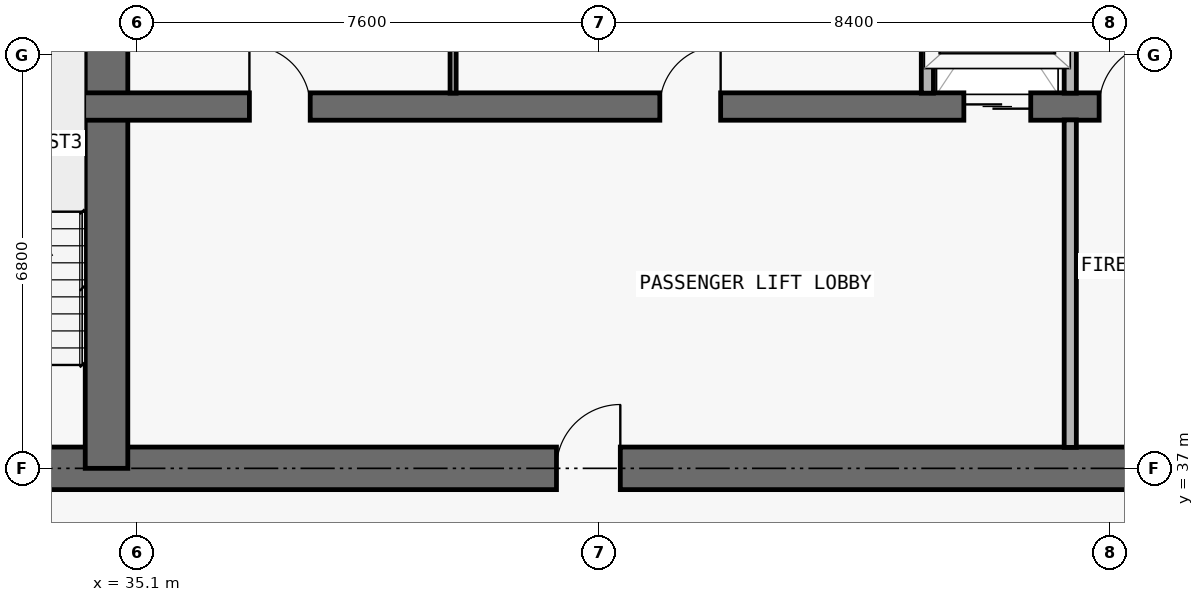
"""IFC4 building model, lengths in metres.
Left out: names, types, materials, properties, quantities, classifications, styles, units other than length and angle.
Written with IfcOpenShell. Run it as: python <this file> out.ifc"""

import sys

from ifc_helpers import new_model, si_unit, direction, frame, frame_2d, origin, place, context, subcontext, project, spatial, rectangle, extrude, element, fill, save


model = new_model("IFC4")
c1 = context("Model", 3, precision=1e-05, world=origin(), true_north=direction((0.0, 1.0)))
c2 = subcontext(c1, "Body", "Model", "MODEL_VIEW")
j1 = project(units=[si_unit("LENGTHUNIT", "METRE"), si_unit("PLANEANGLEUNIT", "RADIAN")], contexts=[c1])
p1 = place(None, origin())
s1 = spatial("IfcSite", under=j1, at=p1, CompositionType="ELEMENT")
p2 = place(p1, origin())
s2 = spatial("IfcBuilding", under=s1, at=p2, CompositionType="ELEMENT")
p3 = place(p2, frame((0.0, 0.0, 246.3)))
s3 = spatial("IfcBuildingStorey", under=s2, at=p3, CompositionType="ELEMENT", Elevation=246.3)
p4 = place(p3, frame((17.95, 37.0, 0.0), z_axis=(0.0, 0.0, 1.0), x_axis=(1.0, 0.0, 0.0)))
e1 = element("IfcWall", 1, at=p4, inside=s3, PredefinedType="SHEAR", context=c2, shape_type="SweptSolid", body=[
    extrude(rectangle(XDim=41.9, YDim=0.7, at=frame_2d((20.95, 0.0))), origin(), (0.0, 0.0, 1.0), 3.05),
])
p5 = place(p4, frame((14.35, 0.0, 0.0)))
e2 = element("IfcOpeningElement", 2, at=p5, cuts=e1, PredefinedType="OPENING", context=c2, shape_type="SweptSolid", body=[
    extrude(rectangle(XDim=1.1, YDim=2.15, at=frame_2d((0.55, 1.075))), frame((0.0, 0.36, 0.0), z_axis=(0.0, -1.0, 0.0), x_axis=(1.0, 0.0, 0.0)), (0.0, 0.0, 1.0), 0.72),
])
p6 = place(p4, frame((6.2, 0.0, 0.0)))
e3 = element("IfcOpeningElement", 3, at=p6, cuts=e1, PredefinedType="OPENING", context=c2, shape_type="SweptSolid", body=[
    extrude(rectangle(XDim=1.05, YDim=2.15, at=frame_2d((0.525, 1.075))), frame((0.0, 0.36, 0.0), z_axis=(0.0, -1.0, 0.0), x_axis=(1.0, 0.0, 0.0)), (0.0, 0.0, 1.0), 0.72),
])
p7 = place(p4, frame((34.7, 0.0, 0.0)))
e4 = element("IfcOpeningElement", 4, at=p7, cuts=e1, PredefinedType="OPENING", context=c2, shape_type="SweptSolid", body=[
    extrude(rectangle(XDim=1.05, YDim=2.15, at=frame_2d((0.525, 1.075))), frame((0.0, 0.36, 0.0), z_axis=(0.0, -1.0, 0.0), x_axis=(1.0, 0.0, 0.0)), (0.0, 0.0, 1.0), 0.72),
])
p8 = place(p4, frame((10.812, 0.0, 0.0)))
e5 = element("IfcOpeningElement", 5, at=p8, cuts=e1, PredefinedType="OPENING", context=c2, shape_type="SweptSolid", body=[
    extrude(rectangle(XDim=1.05, YDim=2.15, at=frame_2d((0.525, 1.075))), frame((0.0, 0.36, 0.0), z_axis=(0.0, -1.0, 0.0), x_axis=(1.0, 0.0, 0.0)), (0.0, 0.0, 1.0), 0.72),
])
p9 = place(p4, frame((24.05, 0.0, 0.0)))
e6 = element("IfcOpeningElement", 6, at=p9, cuts=e1, PredefinedType="OPENING", context=c2, shape_type="SweptSolid", body=[
    extrude(rectangle(XDim=1.05, YDim=2.15, at=frame_2d((0.525, 1.075))), frame((0.0, 0.36, 0.0), z_axis=(0.0, -1.0, 0.0), x_axis=(1.0, 0.0, 0.0)), (0.0, 0.0, 1.0), 0.72),
])
p10 = place(p3, frame((34.6, 37.0, 0.0), z_axis=(0.0, 0.0, 1.0), x_axis=(0.0, 1.0, 0.0)))
e7 = element("IfcWall", 7, at=p10, inside=s3, PredefinedType="SHEAR", context=c2, shape_type="SweptSolid", body=[
    extrude(rectangle(XDim=9.575, YDim=0.7, at=frame_2d((4.788, 0.0))), origin(), (0.0, 0.0, 1.0), 3.05),
])
p11 = place(p3, frame((22.25, 42.95, 0.0), z_axis=(0.0, 0.0, 1.0), x_axis=(1.0, 0.0, 0.0)))
e8 = element("IfcWall", 8, at=p11, inside=s3, PredefinedType="SHEAR", context=c2, shape_type="SweptSolid", body=[
    extrude(rectangle(XDim=33.3, YDim=0.45, at=frame_2d((16.65, 0.0))), origin(), (0.0, 0.0, 1.0), 3.05),
])
p12 = place(p11, frame((1.05, 0.0, 0.0)))
e9 = element("IfcOpeningElement", 9, at=p12, cuts=e8, PredefinedType="OPENING", context=c2, shape_type="SweptSolid", body=[
    extrude(rectangle(XDim=1.2, YDim=2.2, at=frame_2d((0.6, 1.1))), frame((0.0, 0.235, 0.0), z_axis=(0.0, -1.0, 0.0), x_axis=(1.0, 0.0, 0.0)), (0.0, 0.0, 1.0), 0.47),
])
p13 = place(p11, frame((31.05, 0.0, 0.0)))
e10 = element("IfcOpeningElement", 10, at=p13, cuts=e8, PredefinedType="OPENING", context=c2, shape_type="SweptSolid", body=[
    extrude(rectangle(XDim=1.2, YDim=2.2, at=frame_2d((0.6, 1.1))), frame((0.0, 0.235, 0.0), z_axis=(0.0, -1.0, 0.0), x_axis=(1.0, 0.0, 0.0)), (0.0, 0.0, 1.0), 0.47),
])
p14 = place(p11, frame((26.45, 0.0, 0.0)))
e11 = element("IfcOpeningElement", 11, at=p14, cuts=e8, PredefinedType="OPENING", context=c2, shape_type="SweptSolid", body=[
    extrude(rectangle(XDim=1.1, YDim=2.2, at=frame_2d((0.55, 1.1))), frame((0.0, 0.235, 0.0), z_axis=(0.0, -1.0, 0.0), x_axis=(1.0, 0.0, 0.0)), (0.0, 0.0, 1.0), 0.47),
])
p15 = place(p11, frame((5.95, 0.0, 0.0)))
e12 = element("IfcOpeningElement", 12, at=p15, cuts=e8, PredefinedType="OPENING", context=c2, shape_type="SweptSolid", body=[
    extrude(rectangle(XDim=1.1, YDim=2.2, at=frame_2d((0.55, 1.1))), frame((0.0, 0.235, 0.0), z_axis=(0.0, -1.0, 0.0), x_axis=(1.0, 0.0, 0.0)), (0.0, 0.0, 1.0), 0.47),
])
p16 = place(p11, frame((3.625, 0.0, 0.0)))
e13 = element("IfcOpeningElement", 13, at=p16, cuts=e8, PredefinedType="OPENING", context=c2, shape_type="SweptSolid", body=[
    extrude(rectangle(XDim=1.05, YDim=2.15, at=frame_2d((0.525, 1.075))), frame((0.0, 0.235, 0.0), z_axis=(0.0, -1.0, 0.0), x_axis=(1.0, 0.0, 0.0)), (0.0, 0.0, 1.0), 0.47),
])
p17 = place(p11, frame((28.675, 0.0, 0.0)))
e14 = element("IfcOpeningElement", 14, at=p17, cuts=e8, PredefinedType="OPENING", context=c2, shape_type="SweptSolid", body=[
    extrude(rectangle(XDim=1.05, YDim=2.15, at=frame_2d((0.525, 1.075))), frame((0.0, 0.235, 0.0), z_axis=(0.0, -1.0, 0.0), x_axis=(1.0, 0.0, 0.0)), (0.0, 0.0, 1.0), 0.47),
])
p18 = place(p11, frame((14.7, 0.0, 0.0)))
e15 = element("IfcOpeningElement", 15, at=p18, cuts=e8, PredefinedType="OPENING", context=c2, shape_type="SweptSolid", body=[
    extrude(rectangle(XDim=1.0, YDim=2.2, at=frame_2d((0.5, 1.1))), frame((0.0, 0.235, 0.0), z_axis=(0.0, -1.0, 0.0), x_axis=(1.0, 0.0, 0.0)), (0.0, 0.0, 1.0), 0.47),
])
p19 = place(p11, frame((21.45, 0.0, 0.0)))
e16 = element("IfcOpeningElement", 16, at=p19, cuts=e8, PredefinedType="OPENING", context=c2, shape_type="SweptSolid", body=[
    extrude(rectangle(XDim=1.0, YDim=2.2, at=frame_2d((0.5, 1.1))), frame((0.0, 0.235, 0.0), z_axis=(0.0, -1.0, 0.0), x_axis=(1.0, 0.0, 0.0)), (0.0, 0.0, 1.0), 0.47),
])
p20 = place(p3, frame((40.3, 43.17, 0.0), z_axis=(0.0, 0.0, 1.0), x_axis=(0.0, 1.0, 0.0)))
e17 = element("IfcWall", 17, at=p20, inside=s3, PredefinedType="MOVABLE", context=c2, shape_type="SweptSolid", body=[
    extrude(rectangle(XDim=3.185, YDim=0.1, at=frame_2d((1.593, 0.0))), origin(), (0.0, 0.0, 1.0), 3.05),
])
p21 = place(p3, frame((48.1, 43.17, 0.0), z_axis=(0.0, 0.0, 1.0), x_axis=(0.0, 1.0, 0.0)))
e18 = element("IfcWall", 18, at=p21, inside=s3, PredefinedType="PARTITIONING", context=c2, shape_type="SweptSolid", body=[
    extrude(rectangle(XDim=3.185, YDim=0.2, at=frame_2d((1.593, 0.0))), origin(), (0.0, 0.0, 1.0), 3.05),
])
p22 = place(p3, frame((50.45, 37.345, 0.0), z_axis=(0.0, 0.0, 1.0), x_axis=(0.0, 1.0, 0.0)))
e19 = element("IfcWall", 19, at=p22, inside=s3, PredefinedType="PARTITIONING", context=c2, shape_type="SweptSolid", body=[
    extrude(rectangle(XDim=5.385, YDim=0.2, at=frame_2d((2.692, 0.0))), origin(), (0.0, 0.0, 1.0), 3.05),
])
p23 = place(p3, frame((50.45, 43.17, 0.0), z_axis=(0.0, 0.0, 1.0), x_axis=(0.0, 1.0, 0.0)))
e20 = element("IfcWall", 20, at=p23, inside=s3, PredefinedType="PARTITIONING", context=c2, shape_type="SweptSolid", body=[
    extrude(rectangle(XDim=3.185, YDim=0.2, at=frame_2d((1.593, 0.0))), origin(), (0.0, 0.0, 1.0), 3.05),
])
p24 = place(p14, origin())
e21 = element("IfcDoor", 21, at=p24, inside=s3, OperationType="DOUBLE_DOOR_SLIDING", PredefinedType="DOOR", context=c2, shape_type="SweptSolid", body=[
    extrude(rectangle(XDim=1.1, YDim=2.2, at=frame_2d((0.55, 1.1))), frame((0.0, 0.025, 0.0), z_axis=(0.0, -1.0, 0.0), x_axis=(1.0, 0.0, 0.0)), (0.0, 0.0, 1.0), 0.05),
])
fill(e11, e21)
p25 = place(p17, origin())
e22 = element("IfcDoor", 22, at=p25, inside=s3, OperationType="SINGLE_SWING_RIGHT", PredefinedType="DOOR", context=c2, shape_type="SweptSolid", body=[
    extrude(rectangle(XDim=1.05, YDim=2.15, at=frame_2d((0.525, 1.075))), frame((0.0, 0.025, 0.0), z_axis=(0.0, -1.0, 0.0), x_axis=(1.0, 0.0, 0.0)), (0.0, 0.0, 1.0), 0.05),
])
fill(e14, e22)
p26 = place(p9, origin())
e23 = element("IfcDoor", 23, at=p26, inside=s3, OperationType="SINGLE_SWING_RIGHT", PredefinedType="DOOR", context=c2, shape_type="SweptSolid", body=[
    extrude(rectangle(XDim=1.05, YDim=2.15, at=frame_2d((0.525, 1.075))), frame((0.0, 0.025, 0.0), z_axis=(0.0, -1.0, 0.0), x_axis=(1.0, 0.0, 0.0)), (0.0, 0.0, 1.0), 0.05),
])
fill(e6, e23)
p27 = place(p18, origin())
e24 = element("IfcDoor", 24, at=p27, inside=s3, OperationType="SINGLE_SWING_LEFT", PredefinedType="DOOR", context=c2, shape_type="SweptSolid", body=[
    extrude(rectangle(XDim=1.0, YDim=2.2, at=frame_2d((0.5, 1.1))), frame((0.0, 0.025, 0.0), z_axis=(0.0, -1.0, 0.0), x_axis=(1.0, 0.0, 0.0)), (0.0, 0.0, 1.0), 0.05),
])
fill(e15, e24)
p28 = place(p19, origin())
e25 = element("IfcDoor", 25, at=p28, inside=s3, OperationType="SINGLE_SWING_RIGHT", PredefinedType="DOOR", context=c2, shape_type="SweptSolid", body=[
    extrude(rectangle(XDim=1.0, YDim=2.2, at=frame_2d((0.5, 1.1))), frame((0.0, 0.025, 0.0), z_axis=(0.0, -1.0, 0.0), x_axis=(1.0, 0.0, 0.0)), (0.0, 0.0, 1.0), 0.05),
])
fill(e16, e25)
save(model, sys.argv[1])
